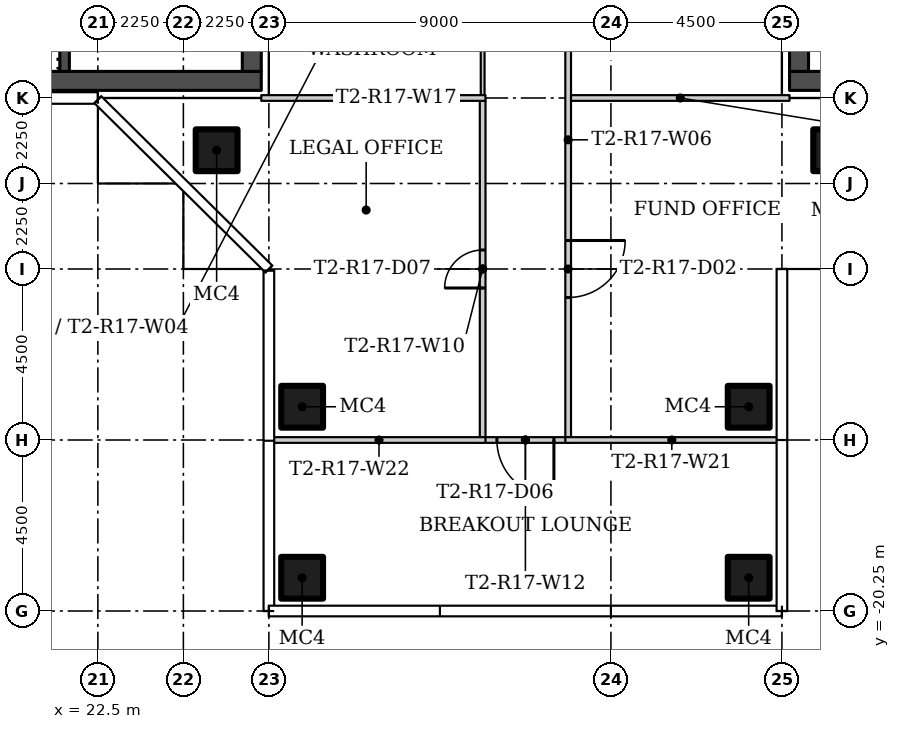
"""IFC4 building model, lengths in metres.
Left out: names, types, materials, properties, quantities, classifications, styles, units other than length and angle.
Written with IfcOpenShell. Run it as: python <this file> out.ifc"""

import sys

from ifc_helpers import new_model, si_unit, direction, frame, frame_2d, origin, origin_2d, place, context, subcontext, project, spatial, rectangle, hollow_rectangle, extrude, element, fill, save


model = new_model("IFC4")
c1 = context("Model", 3, precision=1e-05, world=origin(), true_north=direction((0.0, 1.0)))
c2 = subcontext(c1, "Body", "Model", "MODEL_VIEW")
j1 = project(units=[si_unit("LENGTHUNIT", "METRE"), si_unit("PLANEANGLEUNIT", "RADIAN")], contexts=[c1])
p1 = place(None, origin())
s1 = spatial("IfcSite", under=j1, at=p1, CompositionType="ELEMENT")
p2 = place(p1, origin())
s2 = spatial("IfcBuilding", under=s1, at=p2, CompositionType="ELEMENT")
p3 = place(p2, frame((0.0, 0.0, 150.6)))
s3 = spatial("IfcBuildingStorey", under=s2, at=p3, CompositionType="ELEMENT", Elevation=150.6)
for number, where in (
    (1, (25.625, -8.125, 0.0)),
    (2, (41.875, -8.125, 0.0)),
    (3, (39.625, -14.875, 0.0)),
    (4, (39.625, -19.375, 0.0)),
    (5, (27.875, -14.875, 0.0)),
    (6, (27.875, -19.375, 0.0)),
):
    element("IfcColumn", number, at=place(p3, frame(where)), inside=s3, PredefinedType="COLUMN", context=c2, shape_type="SweptSolid", body=[
        extrude(hollow_rectangle(XDim=1.1, YDim=1.1, WallThickness=0.04, at=origin_2d()), origin(), (0.0, 0.0, 1.0), 3.55),
    ])
p4 = place(p3, frame((32.625, -6.675, 0.0), z_axis=(0.0, 0.0, 1.0), x_axis=(0.0, 1.0, 0.0)))
e7 = element("IfcWall", 7, at=p4, inside=s3, PredefinedType="PARTITIONING", context=c2, shape_type="SweptSolid", body=[
    extrude(rectangle(XDim=6.675, YDim=0.1, at=frame_2d((3.337, 0.0))), origin(), (0.0, 0.0, 1.0), 3.55),
])
p5 = place(p4, frame((1.35, 0.0, 0.0)))
e8 = element("IfcOpeningElement", 8, at=p5, cuts=e7, PredefinedType="OPENING", context=c2, shape_type="SweptSolid", body=[
    extrude(rectangle(XDim=0.9, YDim=2.1, at=frame_2d((0.45, 1.05))), frame((0.0, 0.06, 0.0), z_axis=(0.0, -1.0, 0.0), x_axis=(1.0, 0.0, 0.0)), (0.0, 0.0, 1.0), 0.12),
])
p6 = place(p3, frame((34.875, -0.025, 0.0), z_axis=(0.0, 0.0, 1.0), x_axis=(0.0, -1.0, 0.0)))
e9 = element("IfcWall", 9, at=p6, inside=s3, PredefinedType="PARTITIONING", context=c2, shape_type="SweptSolid", body=[
    extrude(rectangle(XDim=15.65, YDim=0.15, at=frame_2d((7.825, 0.0))), origin(), (0.0, 0.0, 1.0), 3.55),
])
p7 = place(p6, frame((10.475, 0.0, 0.0)))
e10 = element("IfcOpeningElement", 10, at=p7, cuts=e9, PredefinedType="OPENING", context=c2, shape_type="SweptSolid", body=[
    extrude(rectangle(XDim=1.5, YDim=2.1, at=frame_2d((0.75, 1.05))), frame((0.0, 0.085, 0.0), z_axis=(0.0, -1.0, 0.0), x_axis=(1.0, 0.0, 0.0)), (0.0, 0.0, 1.0), 0.17),
])
p8 = place(p6, frame((2.875, 0.0, 0.0)))
e11 = element("IfcOpeningElement", 11, at=p8, cuts=e9, PredefinedType="OPENING", context=c2, shape_type="SweptSolid", body=[
    extrude(rectangle(XDim=0.9, YDim=2.1, at=frame_2d((0.45, 1.05))), frame((0.0, 0.085, 0.0), z_axis=(0.0, -1.0, 0.0), x_axis=(1.0, 0.0, 0.0)), (0.0, 0.0, 1.0), 0.17),
])
p9 = place(p3, frame((32.625, -15.675, 0.0), z_axis=(0.0, 0.0, 1.0), x_axis=(0.0, 1.0, 0.0)))
e12 = element("IfcWall", 12, at=p9, inside=s3, PredefinedType="PARTITIONING", context=c2, shape_type="SweptSolid", body=[
    extrude(rectangle(XDim=8.85, YDim=0.15, at=frame_2d((4.425, 0.0))), origin(), (0.0, 0.0, 1.0), 3.55),
])
p10 = place(p9, frame((3.925, 0.0, 0.0)))
e13 = element("IfcOpeningElement", 13, at=p10, cuts=e12, PredefinedType="OPENING", context=c2, shape_type="SweptSolid", body=[
    extrude(rectangle(XDim=1.0, YDim=2.4, at=frame_2d((0.5, 1.2))), frame((0.0, 0.085, 0.0), z_axis=(0.0, -1.0, 0.0), x_axis=(1.0, 0.0, 0.0)), (0.0, 0.0, 1.0), 0.17),
])
p11 = place(p3, frame((34.95, -15.75, 0.0), z_axis=(0.0, 0.0, 1.0), x_axis=(-1.0, 0.0, 0.0)))
e14 = element("IfcWall", 14, at=p11, inside=s3, PredefinedType="PARTITIONING", context=c2, shape_type="SweptSolid", body=[
    extrude(rectangle(XDim=2.4, YDim=0.15, at=frame_2d((1.2, 0.0))), origin(), (0.0, 0.0, 1.0), 3.55),
])
p12 = place(p11, frame((0.45, 0.0, 0.0)))
e15 = element("IfcOpeningElement", 15, at=p12, cuts=e14, PredefinedType="OPENING", context=c2, shape_type="SweptSolid", body=[
    extrude(rectangle(XDim=1.5, YDim=2.1, at=frame_2d((0.75, 1.05))), frame((0.0, 0.085, 0.0), z_axis=(0.0, -1.0, 0.0), x_axis=(1.0, 0.0, 0.0)), (0.0, 0.0, 1.0), 0.17),
])
p13 = place(p3, frame((34.95, -6.75, 0.0)))
e16 = element("IfcWall", 16, at=p13, inside=s3, PredefinedType="PARTITIONING", context=c2, shape_type="SweptSolid", body=[
    extrude(rectangle(XDim=5.75, YDim=0.15, at=frame_2d((2.875, 0.0))), origin(), (0.0, 0.0, 1.0), 3.55),
])
p14 = place(p3, frame((26.8, -6.75, 0.0)))
e17 = element("IfcWall", 17, at=p14, inside=s3, PredefinedType="PARTITIONING", context=c2, shape_type="SweptSolid", body=[
    extrude(rectangle(XDim=5.9, YDim=0.15, at=frame_2d((2.95, 0.0))), origin(), (0.0, 0.0, 1.0), 3.55),
])
for number, where in (
    (18, (34.8, -15.75, 0.0)),
    (19, (27.095, -15.75, 0.0)),
):
    element("IfcWall", number, at=place(p3, frame(where)), inside=s3, PredefinedType="PARTITIONING", context=c2, shape_type="SweptSolid", body=[
        extrude(rectangle(XDim=5.605, YDim=0.15, at=frame_2d((2.802, 0.0))), origin(), (0.0, 0.0, 1.0), 3.55),
    ])
p15 = place(p3, frame((13.7, -6.3, 0.0)))
e20 = element("IfcWall", 20, at=p15, inside=s3, PredefinedType="SHEAR", context=c2, shape_type="SweptSolid", body=[
    extrude(rectangle(XDim=13.1, YDim=0.5, at=frame_2d((6.55, 0.0))), origin(), (0.0, 0.0, 1.0), 3.55),
])
p16 = place(p3, frame((26.55, 6.05, 0.0), z_axis=(0.0, 0.0, 1.0), x_axis=(0.0, -1.0, 0.0)))
e21 = element("IfcWall", 21, at=p16, inside=s3, PredefinedType="SHEAR", context=c2, shape_type="SweptSolid", body=[
    extrude(rectangle(XDim=12.1, YDim=0.5, at=frame_2d((6.05, 0.0))), origin(), (0.0, 0.0, 1.0), 3.55),
])
p17 = place(p16, frame((10.1, 0.0, 0.0)))
e22 = element("IfcOpeningElement", 22, at=p17, cuts=e21, PredefinedType="OPENING", context=c2, shape_type="SweptSolid", body=[
    extrude(rectangle(XDim=1.2, YDim=2.1, at=frame_2d((0.6, 1.05))), frame((0.0, 0.26, 0.0), z_axis=(0.0, -1.0, 0.0), x_axis=(1.0, 0.0, 0.0)), (0.0, 0.0, 1.0), 0.52),
])
p18 = place(p16, frame((3.9, 0.0, 0.0)))
e23 = element("IfcOpeningElement", 23, at=p18, cuts=e21, PredefinedType="OPENING", context=c2, shape_type="SweptSolid", body=[
    extrude(rectangle(XDim=1.8, YDim=2.4, at=frame_2d((0.9, 1.2))), frame((0.0, 0.26, 0.0), z_axis=(0.0, -1.0, 0.0), x_axis=(1.0, 0.0, 0.0)), (0.0, 0.0, 1.0), 0.52),
])
p19 = place(p3, frame((21.625, -6.05, 0.0), z_axis=(0.0, 0.0, 1.0), x_axis=(0.0, 1.0, 0.0)))
e24 = element("IfcWall", 24, at=p19, inside=s3, PredefinedType="SHEAR", context=c2, shape_type="SweptSolid", body=[
    extrude(rectangle(XDim=2.55, YDim=0.25, at=frame_2d((1.275, 0.0))), origin(), (0.0, 0.0, 1.0), 3.55),
])
p20 = place(p3, frame((53.8, -6.3, 0.0), z_axis=(0.0, 0.0, 1.0), x_axis=(-1.0, 0.0, 0.0)))
e25 = element("IfcWall", 25, at=p20, inside=s3, PredefinedType="SHEAR", context=c2, shape_type="SweptSolid", body=[
    extrude(rectangle(XDim=13.1, YDim=0.5, at=frame_2d((6.55, 0.0))), origin(), (0.0, 0.0, 1.0), 3.55),
])
p21 = place(p3, frame((40.95, -6.05, 0.0), z_axis=(0.0, 0.0, 1.0), x_axis=(0.0, 1.0, 0.0)))
e26 = element("IfcWall", 26, at=p21, inside=s3, PredefinedType="SHEAR", context=c2, shape_type="SweptSolid", body=[
    extrude(rectangle(XDim=12.1, YDim=0.5, at=frame_2d((6.05, 0.0))), origin(), (0.0, 0.0, 1.0), 3.55),
])
p22 = place(p21, frame((0.8, 0.0, 0.0)))
e27 = element("IfcOpeningElement", 27, at=p22, cuts=e26, PredefinedType="OPENING", context=c2, shape_type="SweptSolid", body=[
    extrude(rectangle(XDim=1.2, YDim=2.1, at=frame_2d((0.6, 1.05))), frame((0.0, 0.26, 0.0), z_axis=(0.0, -1.0, 0.0), x_axis=(1.0, 0.0, 0.0)), (0.0, 0.0, 1.0), 0.52),
])
p23 = place(p21, frame((6.4, 0.0, 0.0)))
e28 = element("IfcOpeningElement", 28, at=p23, cuts=e26, PredefinedType="OPENING", context=c2, shape_type="SweptSolid", body=[
    extrude(rectangle(XDim=1.8, YDim=2.4, at=frame_2d((0.9, 1.2))), frame((0.0, 0.26, 0.0), z_axis=(0.0, -1.0, 0.0), x_axis=(1.0, 0.0, 0.0)), (0.0, 0.0, 1.0), 0.52),
])
p24 = place(p7, origin())
e29 = element("IfcDoor", 29, at=p24, inside=s3, OperationType="DOUBLE_DOOR_SINGLE_SWING", PredefinedType="DOOR", context=c2, shape_type="SweptSolid", body=[
    extrude(rectangle(XDim=1.5, YDim=2.1, at=frame_2d((0.75, 1.05))), frame((0.0, 0.025, 0.0), z_axis=(0.0, -1.0, 0.0), x_axis=(1.0, 0.0, 0.0)), (0.0, 0.0, 1.0), 0.05),
])
fill(e10, e29)
p25 = place(p12, origin())
e30 = element("IfcDoor", 30, at=p25, inside=s3, OperationType="DOUBLE_DOOR_SINGLE_SWING", PredefinedType="DOOR", context=c2, shape_type="SweptSolid", body=[
    extrude(rectangle(XDim=1.5, YDim=2.1, at=frame_2d((0.75, 1.05))), frame((0.0, 0.025, 0.0), z_axis=(0.0, -1.0, 0.0), x_axis=(1.0, 0.0, 0.0)), (0.0, 0.0, 1.0), 0.05),
])
fill(e15, e30)
p26 = place(p10, origin())
e31 = element("IfcDoor", 31, at=p26, inside=s3, OperationType="SINGLE_SWING_LEFT", PredefinedType="DOOR", context=c2, shape_type="SweptSolid", body=[
    extrude(rectangle(XDim=1.0, YDim=2.4, at=frame_2d((0.5, 1.2))), frame((0.0, 0.025, 0.0), z_axis=(0.0, -1.0, 0.0), x_axis=(1.0, 0.0, 0.0)), (0.0, 0.0, 1.0), 0.05),
])
fill(e13, e31)
save(model, sys.argv[1])
